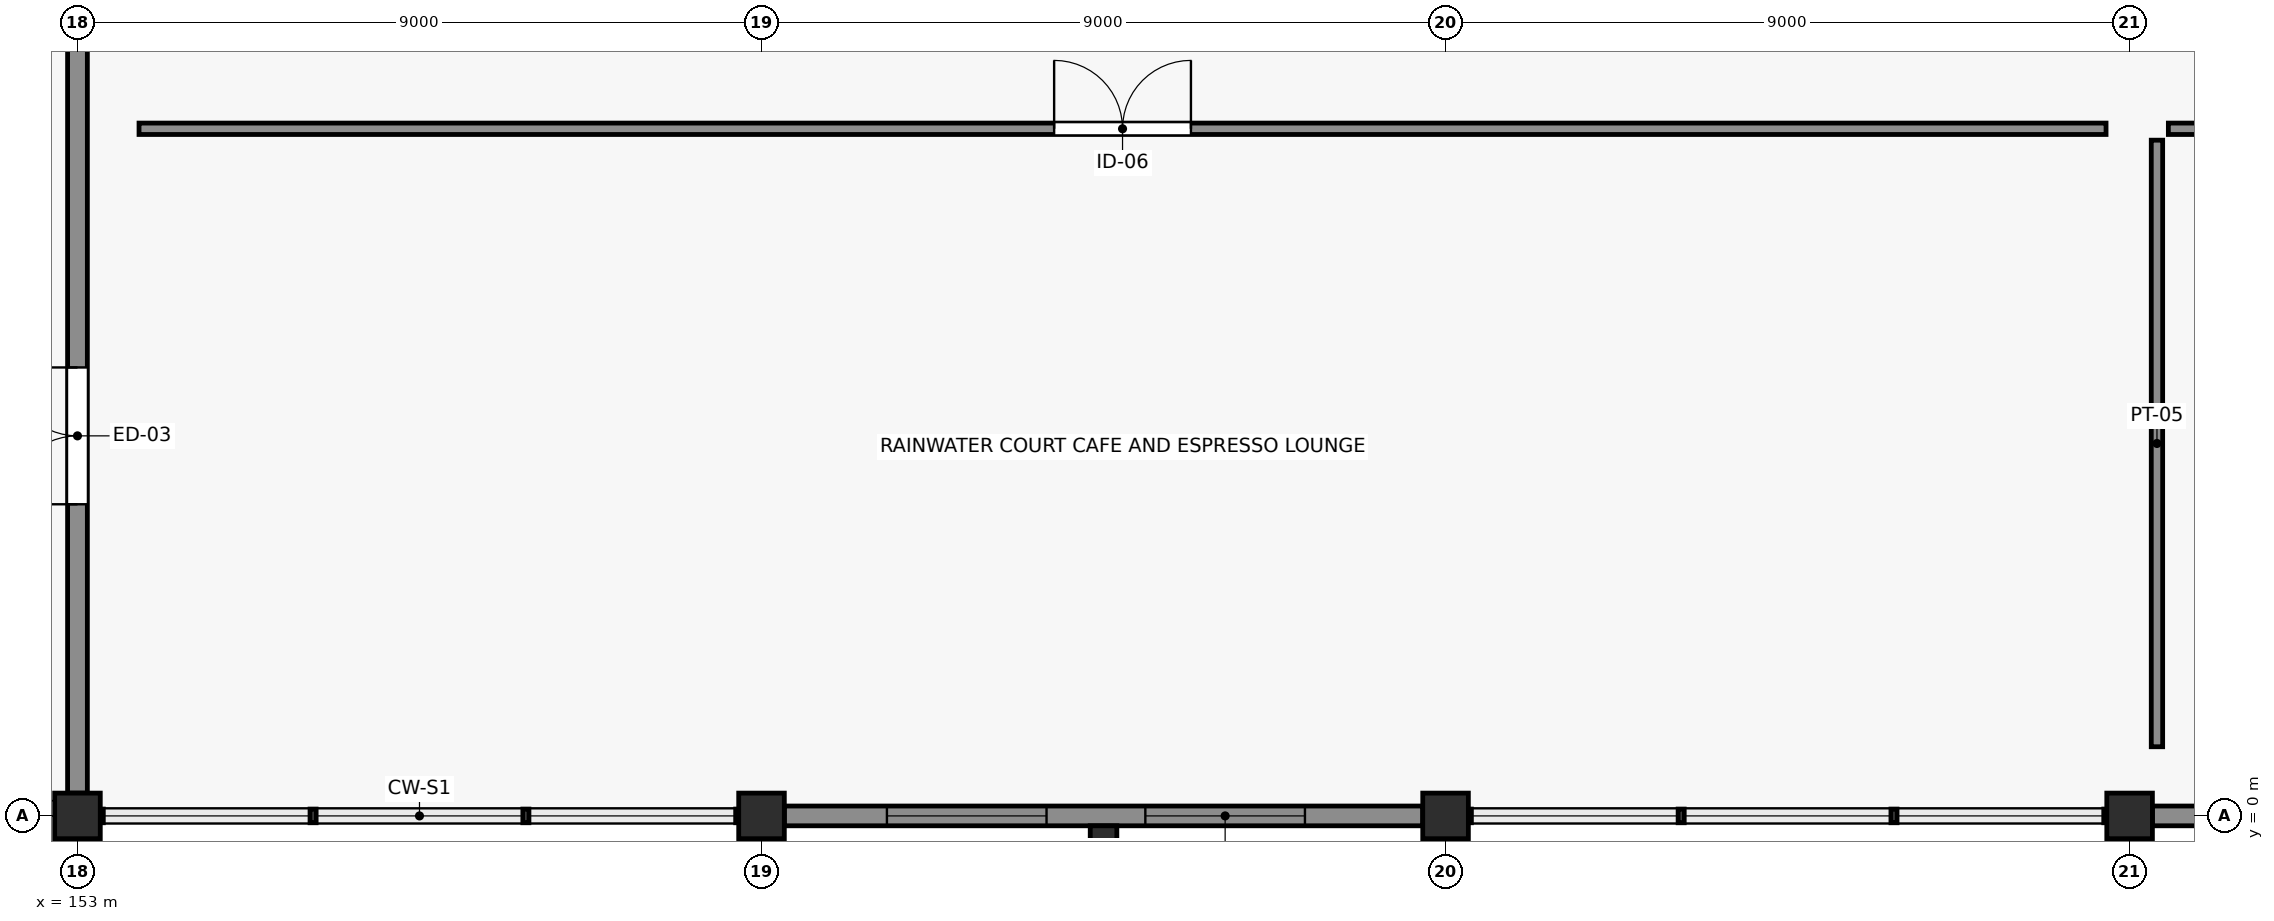
"""IFC4 building model, lengths in metres.
Left out: names, types, materials, properties, quantities, classifications, styles, units other than length and angle.
Written with IfcOpenShell. Run it as: python <this file> out.ifc"""

import sys

from ifc_helpers import new_model, si_unit, direction, frame, frame_2d, origin, origin_2d, place, context, subcontext, project, spatial, rectangle, extrude, element, fill, save


model = new_model("IFC4")
c1 = context("Model", 3, precision=1e-05, world=origin(), true_north=direction((0.0, 1.0)))
c2 = subcontext(c1, "Body", "Model", "MODEL_VIEW")
j1 = project(units=[si_unit("LENGTHUNIT", "METRE"), si_unit("PLANEANGLEUNIT", "RADIAN")], contexts=[c1])
p1 = place(None, origin())
s1 = spatial("IfcSite", under=j1, at=p1, CompositionType="ELEMENT")
p2 = place(p1, origin())
s2 = spatial("IfcBuilding", under=s1, at=p2, CompositionType="ELEMENT")
p3 = place(p2, frame((0.0, 0.0, 4.8)))
s3 = spatial("IfcBuildingStorey", under=s2, at=p3, CompositionType="ELEMENT", Elevation=4.8)
for number, where, z_axis, x_axis in (
    (1, (153.0, 0.0, 0.0), (0.0, 0.0, 1.0), (1.0, 0.0, 0.0)),
    (2, (162.0, 0.0, 0.0), (0.0, 0.0, 1.0), (1.0, 0.0, 0.0)),
    (3, (171.0, 0.0, 0.0), (0.0, 0.0, 1.0), (1.0, 0.0, 0.0)),
    (4, (180.0, 0.0, 0.0), (0.0, 0.0, 1.0), (1.0, 0.0, 0.0)),
):
    element("IfcColumn", number, at=place(p3, frame(where, z_axis=z_axis, x_axis=x_axis)), inside=s3, PredefinedType="COLUMN", context=c2, shape_type="SweptSolid", body=[
        extrude(rectangle(XDim=0.6, YDim=0.6, at=origin_2d()), origin(), (0.0, 0.0, 1.0), 4.815),
    ])
p4 = place(p3, frame((166.5, -0.38, 0.0), z_axis=(0.0, 0.0, 1.0), x_axis=(1.0, 0.0, 0.0)))
e5 = element("IfcColumn", 5, at=p4, inside=s3, PredefinedType="PILASTER", context=c2, shape_type="SweptSolid", body=[
    extrude(rectangle(XDim=0.35, YDim=0.5, at=origin_2d()), origin(), (0.0, 0.0, 1.0), 4.815),
])
p5 = place(p3, frame((170.7, 0.0, 0.0), z_axis=(0.0, 0.0, 1.0), x_axis=(-1.0, 0.0, 0.0)))
e6 = element("IfcWall", 6, at=p5, inside=s3, PredefinedType="SOLIDWALL", context=c2, shape_type="SweptSolid", body=[
    extrude(rectangle(XDim=8.4, YDim=0.26, at=frame_2d((4.2, 0.0))), origin(), (0.0, 0.0, 1.0), 4.35),
])
p6 = place(p5, frame((1.55, 0.0, 1.0)))
e7 = element("IfcOpeningElement", 7, at=p6, cuts=e6, PredefinedType="OPENING", context=c2, shape_type="SweptSolid", body=[
    extrude(rectangle(XDim=2.1, YDim=1.8, at=frame_2d((1.05, 0.9))), frame((0.0, 0.14, 0.0), z_axis=(0.0, -1.0, 0.0), x_axis=(1.0, 0.0, 0.0)), (0.0, 0.0, 1.0), 0.28),
])
p7 = place(p5, frame((4.95, 0.0, 1.0)))
e8 = element("IfcOpeningElement", 8, at=p7, cuts=e6, PredefinedType="OPENING", context=c2, shape_type="SweptSolid", body=[
    extrude(rectangle(XDim=2.1, YDim=1.8, at=frame_2d((1.05, 0.9))), frame((0.0, 0.14, 0.0), z_axis=(0.0, -1.0, 0.0), x_axis=(1.0, 0.0, 0.0)), (0.0, 0.0, 1.0), 0.28),
])
p8 = place(p3, frame((188.7, 0.0, 0.0), z_axis=(0.0, 0.0, 1.0), x_axis=(-1.0, 0.0, 0.0)))
e9 = element("IfcWall", 9, at=p8, inside=s3, PredefinedType="SOLIDWALL", context=c2, shape_type="SweptSolid", body=[
    extrude(rectangle(XDim=8.4, YDim=0.26, at=frame_2d((4.2, 0.0))), origin(), (0.0, 0.0, 1.0), 4.35),
])
p9 = place(p8, frame((1.55, 0.0, 1.0)))
e10 = element("IfcOpeningElement", 10, at=p9, cuts=e9, PredefinedType="OPENING", context=c2, shape_type="SweptSolid", body=[
    extrude(rectangle(XDim=2.1, YDim=1.8, at=frame_2d((1.05, 0.9))), frame((0.0, 0.14, 0.0), z_axis=(0.0, -1.0, 0.0), x_axis=(1.0, 0.0, 0.0)), (0.0, 0.0, 1.0), 0.28),
])
p10 = place(p8, frame((4.95, 0.0, 1.0)))
e11 = element("IfcOpeningElement", 11, at=p10, cuts=e9, PredefinedType="OPENING", context=c2, shape_type="SweptSolid", body=[
    extrude(rectangle(XDim=2.1, YDim=1.8, at=frame_2d((1.05, 0.9))), frame((0.0, 0.14, 0.0), z_axis=(0.0, -1.0, 0.0), x_axis=(1.0, 0.0, 0.0)), (0.0, 0.0, 1.0), 0.28),
])
p11 = place(p3, frame((153.0, 0.3, 0.0), z_axis=(0.0, 0.0, 1.0), x_axis=(0.0, 1.0, 0.0)))
e12 = element("IfcWall", 12, at=p11, inside=s3, PredefinedType="SOLIDWALL", context=c2, shape_type="SweptSolid", body=[
    extrude(rectangle(XDim=10.4, YDim=0.26, at=frame_2d((5.2, 0.0))), origin(), (0.0, 0.0, 1.0), 4.35),
])
p12 = place(p11, frame((3.8, 0.0, 0.0)))
e13 = element("IfcOpeningElement", 13, at=p12, cuts=e12, PredefinedType="OPENING", context=c2, shape_type="SweptSolid", body=[
    extrude(rectangle(XDim=1.8, YDim=2.3, at=frame_2d((0.9, 1.15))), frame((0.0, 0.14, 0.0), z_axis=(0.0, -1.0, 0.0), x_axis=(1.0, 0.0, 0.0)), (0.0, 0.0, 1.0), 0.28),
])
p13 = place(p3, frame((153.81, 9.04, 0.0), z_axis=(0.0, 0.0, 1.0), x_axis=(1.0, 0.0, 0.0)))
e14 = element("IfcWall", 14, at=p13, inside=s3, PredefinedType="PARTITIONING", context=c2, shape_type="SweptSolid", body=[
    extrude(rectangle(XDim=25.88, YDim=0.15, at=frame_2d((12.94, 0.0))), origin(), (0.0, 0.0, 1.0), 4.285),
])
p14 = place(p13, frame((12.04, 0.0, 0.0)))
e15 = element("IfcOpeningElement", 15, at=p14, cuts=e14, PredefinedType="OPENING", context=c2, shape_type="SweptSolid", body=[
    extrude(rectangle(XDim=1.8, YDim=2.3, at=frame_2d((0.9, 1.15))), frame((0.0, 0.085, 0.0), z_axis=(0.0, -1.0, 0.0), x_axis=(1.0, 0.0, 0.0)), (0.0, 0.0, 1.0), 0.17),
])
p15 = place(p3, frame((180.51, 9.04, 0.0), z_axis=(0.0, 0.0, 1.0), x_axis=(1.0, 0.0, 0.0)))
e16 = element("IfcWall", 16, at=p15, inside=s3, PredefinedType="PARTITIONING", context=c2, shape_type="SweptSolid", body=[
    extrude(rectangle(XDim=34.68, YDim=0.15, at=frame_2d((17.34, 0.0))), origin(), (0.0, 0.0, 1.0), 4.285),
])
p16 = place(p15, frame((16.44, 0.0, 0.0)))
e17 = element("IfcOpeningElement", 17, at=p16, cuts=e16, PredefinedType="OPENING", context=c2, shape_type="SweptSolid", body=[
    extrude(rectangle(XDim=1.8, YDim=2.3, at=frame_2d((0.9, 1.15))), frame((0.0, 0.085, 0.0), z_axis=(0.0, -1.0, 0.0), x_axis=(1.0, 0.0, 0.0)), (0.0, 0.0, 1.0), 0.17),
])
p17 = place(p3, frame((180.36, 0.91, 0.0), z_axis=(0.0, 0.0, 1.0), x_axis=(0.0, 1.0, 0.0)))
e18 = element("IfcWall", 18, at=p17, inside=s3, PredefinedType="PARTITIONING", context=c2, shape_type="SweptSolid", body=[
    extrude(rectangle(XDim=7.98, YDim=0.15, at=frame_2d((3.99, 0.0))), origin(), (0.0, 0.0, 1.0), 4.75),
])
p18 = place(p6, origin())
e19 = element("IfcWindow", 19, at=p18, inside=s3, PartitioningType="SINGLE_PANEL", PredefinedType="WINDOW", context=c2, shape_type="SweptSolid", body=[
    extrude(rectangle(XDim=2.1, YDim=1.8, at=frame_2d((1.05, 0.9))), frame((0.0, 0.03, 0.0), z_axis=(0.0, -1.0, 0.0), x_axis=(1.0, 0.0, 0.0)), (0.0, 0.0, 1.0), 0.06),
])
fill(e7, e19)
p19 = place(p7, origin())
e20 = element("IfcWindow", 20, at=p19, inside=s3, PartitioningType="SINGLE_PANEL", PredefinedType="WINDOW", context=c2, shape_type="SweptSolid", body=[
    extrude(rectangle(XDim=2.1, YDim=1.8, at=frame_2d((1.05, 0.9))), frame((0.0, 0.03, 0.0), z_axis=(0.0, -1.0, 0.0), x_axis=(1.0, 0.0, 0.0)), (0.0, 0.0, 1.0), 0.06),
])
fill(e8, e20)
p20 = place(p12, origin())
e21 = element("IfcDoor", 21, at=p20, inside=s3, OperationType="DOUBLE_DOOR_SINGLE_SWING", PredefinedType="DOOR", context=c2, shape_type="SweptSolid", body=[
    extrude(rectangle(XDim=1.8, YDim=2.3, at=frame_2d((0.9, 1.15))), frame((0.0, 0.025, 0.0), z_axis=(0.0, -1.0, 0.0), x_axis=(1.0, 0.0, 0.0)), (0.0, 0.0, 1.0), 0.05),
])
fill(e13, e21)
p21 = place(p14, origin())
e22 = element("IfcDoor", 22, at=p21, inside=s3, OperationType="DOUBLE_DOOR_SINGLE_SWING", PredefinedType="DOOR", context=c2, shape_type="SweptSolid", body=[
    extrude(rectangle(XDim=1.8, YDim=2.3, at=frame_2d((0.9, 1.15))), frame((0.0, 0.025, 0.0), z_axis=(0.0, -1.0, 0.0), x_axis=(1.0, 0.0, 0.0)), (0.0, 0.0, 1.0), 0.05),
])
fill(e15, e22)
save(model, sys.argv[1])
